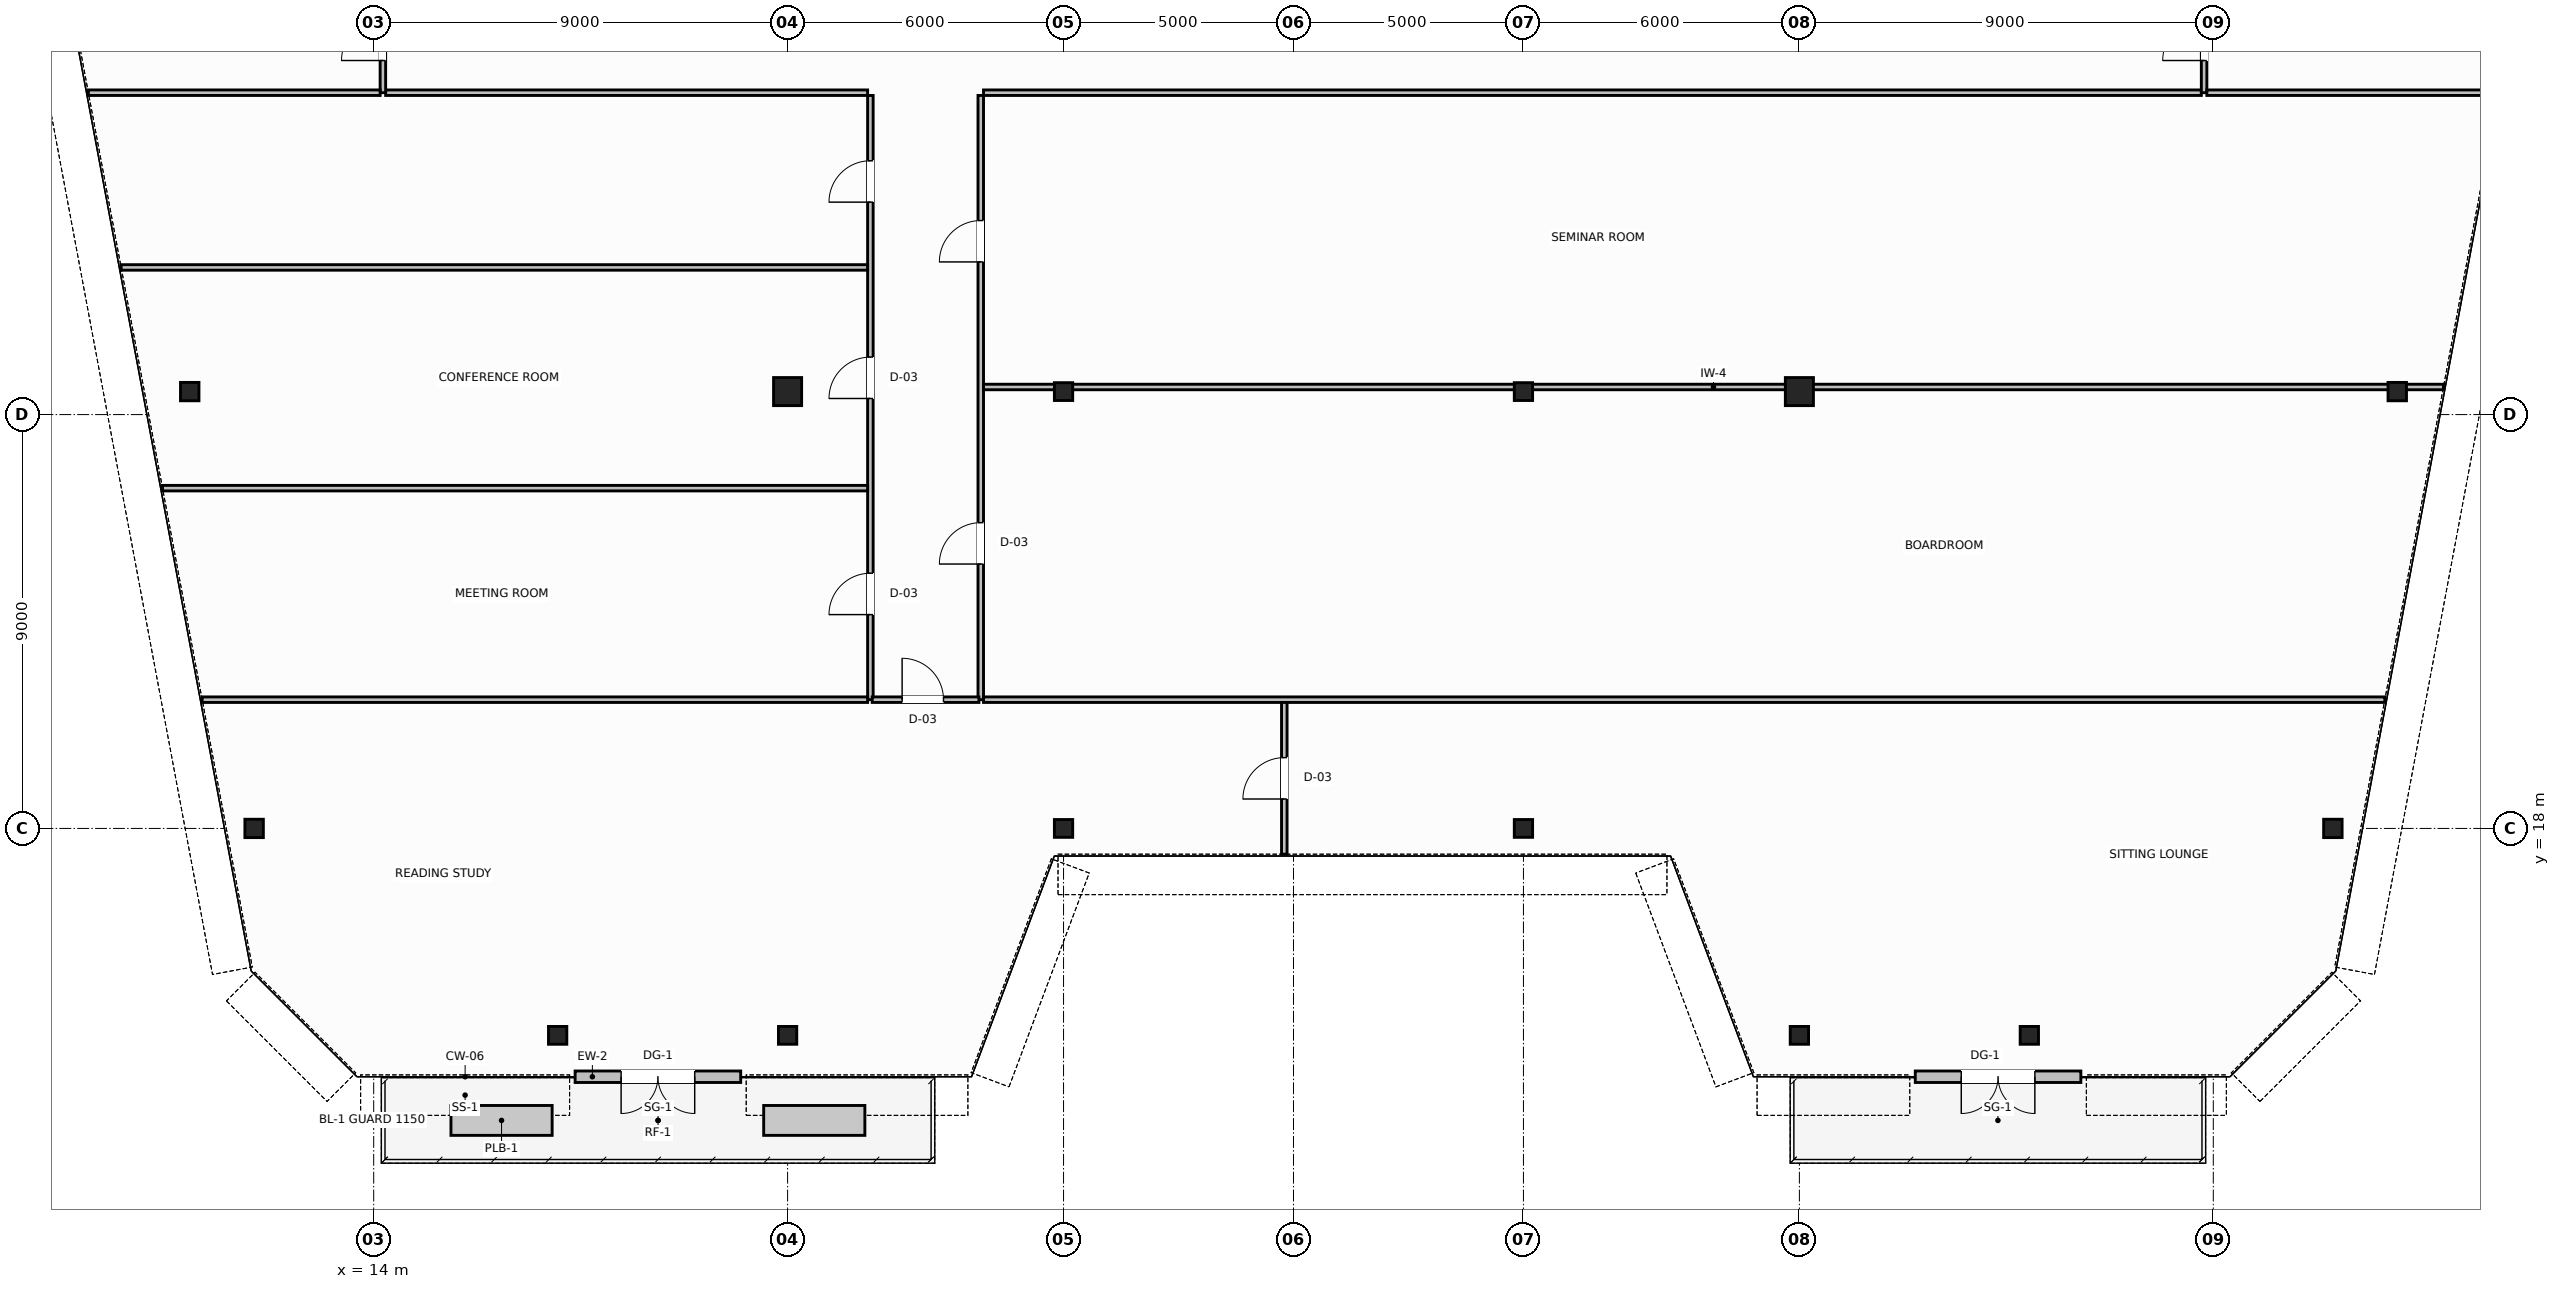
"""IFC4 building model, lengths in metres.
Left out: names, types, materials, properties, quantities, classifications, styles, units other than length and angle.
Written with IfcOpenShell. Run it as: python <this file> out.ifc"""

import sys

from ifc_helpers import new_model, si_unit, direction, frame, frame_2d, origin, origin_2d, place, context, subcontext, project, spatial, rectangle, hollow_circle, i_section, extrude, source, transform, mapped, element, fill, save


model = new_model("IFC4")
c1 = context("Model", 3, precision=1e-05, world=origin(), true_north=direction((0.0, 1.0)))
c2 = subcontext(c1, "Body", "Model", "MODEL_VIEW")
j1 = project(units=[si_unit("LENGTHUNIT", "METRE"), si_unit("PLANEANGLEUNIT", "RADIAN")], contexts=[c1])
p1 = place(None, origin())
s1 = spatial("IfcSite", under=j1, at=p1, CompositionType="ELEMENT")
p2 = place(p1, origin())
s2 = spatial("IfcBuilding", under=s1, at=p2, CompositionType="ELEMENT")
p3 = place(p2, frame((0.0, 0.0, 268.8)))
s3 = spatial("IfcBuildingStorey", under=s2, at=p3, CompositionType="ELEMENT", Elevation=268.8)
m1 = source(origin(), c2, "Body", "SweptSolid", [
    extrude(i_section(OverallWidth=0.401, OverallDepth=0.399, WebThickness=0.025, FlangeThickness=0.035, FilletRadius=0.015, at=origin_2d()), origin(), (0.0, 0.0, 1.0), 3.8),
])
for number, where, z_axis, x_axis in (
    (1, (10.0, 27.5, 0.0), (0.0, 0.0, 1.0), (1.0, 0.0, 0.0)),
    (2, (11.4, 18.0, 0.0), (0.0, 0.0, 1.0), (1.0, 0.0, 0.0)),
    (3, (58.0, 27.5, 0.0), (0.0, 0.0, 1.0), (1.0, 0.0, 0.0)),
    (4, (56.6, 18.0, 0.0), (0.0, 0.0, 1.0), (1.0, 0.0, 0.0)),
):
    element("IfcColumn", number, at=place(p3, frame(where, z_axis=z_axis, x_axis=x_axis)), inside=s3, PredefinedType="COLUMN", context=c2, shape_type="MappedRepresentation", body=[
        mapped(m1, transform((0.0, 0.0, 0.0), scale=1.0)),
    ])
m2 = source(origin(), c2, "Body", "SweptSolid", [
    extrude(hollow_circle(Radius=0.305, WallThickness=0.03, at=origin_2d()), origin(), (0.0, 0.0, 1.0), 3.8),
])
p4 = place(p3, frame((23.0, 27.5, 0.0), z_axis=(0.0, 0.0, 1.0), x_axis=(1.0, 0.0, 0.0)))
e5 = element("IfcColumn", 5, at=p4, inside=s3, PredefinedType="COLUMN", context=c2, shape_type="MappedRepresentation", body=[
    mapped(m2, transform((0.0, 0.0, 0.0), scale=1.0)),
])
m3 = source(origin(), c2, "Body", "SweptSolid", [
    extrude(i_section(OverallWidth=0.398, OverallDepth=0.387, WebThickness=0.021, FlangeThickness=0.029, FilletRadius=0.015, at=origin_2d()), origin(), (0.0, 0.0, 1.0), 3.8),
])
for number, where, z_axis, x_axis in (
    (6, (29.0, 27.5, 0.0), (0.0, 0.0, 1.0), (1.0, 0.0, 0.0)),
    (7, (39.0, 27.5, 0.0), (0.0, 0.0, 1.0), (1.0, 0.0, 0.0)),
):
    element("IfcColumn", number, at=place(p3, frame(where, z_axis=z_axis, x_axis=x_axis)), inside=s3, PredefinedType="COLUMN", context=c2, shape_type="MappedRepresentation", body=[
        mapped(m3, transform((0.0, 0.0, 0.0), scale=1.0)),
    ])
p5 = place(p3, frame((45.0, 27.5, 0.0), z_axis=(0.0, 0.0, 1.0), x_axis=(1.0, 0.0, 0.0)))
e8 = element("IfcColumn", 8, at=p5, inside=s3, PredefinedType="COLUMN", context=c2, shape_type="MappedRepresentation", body=[
    mapped(m2, transform((0.0, 0.0, 0.0), scale=1.0)),
])
m4 = source(origin(), c2, "Body", "SweptSolid", [
    extrude(i_section(OverallWidth=0.398, OverallDepth=0.387, WebThickness=0.021, FlangeThickness=0.029, FilletRadius=0.015, at=origin_2d()), origin(), (0.0, 0.0, 1.0), 4.02),
])
for number, where, z_axis, x_axis in (
    (9, (18.0, 13.5, -0.22), (0.0, 0.0, 1.0), (1.0, 0.0, 0.0)),
    (10, (23.0, 13.5, -0.22), (0.0, 0.0, 1.0), (1.0, 0.0, 0.0)),
    (11, (29.0, 18.0, -0.22), (0.0, 0.0, 1.0), (1.0, 0.0, 0.0)),
    (12, (39.0, 18.0, -0.22), (0.0, 0.0, 1.0), (1.0, 0.0, 0.0)),
    (13, (45.0, 13.5, -0.22), (0.0, 0.0, 1.0), (1.0, 0.0, 0.0)),
    (14, (50.0, 13.5, -0.22), (0.0, 0.0, 1.0), (1.0, 0.0, 0.0)),
):
    element("IfcColumn", number, at=place(p3, frame(where, z_axis=z_axis, x_axis=x_axis)), inside=s3, PredefinedType="COLUMN", context=c2, shape_type="MappedRepresentation", body=[
        mapped(m4, transform((0.0, 0.0, 0.0), scale=1.0)),
    ])
p6 = place(p3, frame((21.98, 12.6, 0.0), z_axis=(0.0, 0.0, 1.0), x_axis=(-1.0, 0.0, 0.0)))
e15 = element("IfcWall", 15, at=p6, inside=s3, PredefinedType="STANDARD", context=c2, shape_type="SweptSolid", body=[
    extrude(rectangle(XDim=3.6, YDim=0.25, at=frame_2d((1.8, 0.0))), origin(), (0.0, 0.0, 1.0), 3.58),
])
p7 = place(p6, frame((1.0, 0.0, 0.0)))
e16 = element("IfcOpeningElement", 16, at=p7, cuts=e15, PredefinedType="OPENING", context=c2, shape_type="SweptSolid", body=[
    extrude(rectangle(XDim=1.6, YDim=2.3, at=frame_2d((0.8, 1.15))), frame((0.0, 0.135, 0.0), z_axis=(0.0, -1.0, 0.0), x_axis=(1.0, 0.0, 0.0)), (0.0, 0.0, 1.0), 0.27),
])
for number, where, z_axis, x_axis in (
    (17, (15.68, 11.65, 0.0), (0.0, 0.0, 1.0), (1.0, 0.0, 0.0)),
    (18, (22.48, 11.65, 0.0), (0.0, 0.0, 1.0), (1.0, 0.0, 0.0)),
):
    element("IfcWall", number, at=place(p3, frame(where, z_axis=z_axis, x_axis=x_axis)), inside=s3, PredefinedType="PARAPET", context=c2, shape_type="SweptSolid", body=[
        extrude(rectangle(XDim=2.2, YDim=0.65, at=frame_2d((1.1, 0.0))), origin(), (0.0, 0.0, 1.0), 0.65),
    ])
p8 = place(p3, frame((51.12, 12.6, 0.0), z_axis=(0.0, 0.0, 1.0), x_axis=(-1.0, 0.0, 0.0)))
e19 = element("IfcWall", 19, at=p8, inside=s3, PredefinedType="STANDARD", context=c2, shape_type="SweptSolid", body=[
    extrude(rectangle(XDim=3.6, YDim=0.25, at=frame_2d((1.8, 0.0))), origin(), (0.0, 0.0, 1.0), 3.58),
])
p9 = place(p8, frame((1.0, 0.0, 0.0)))
e20 = element("IfcOpeningElement", 20, at=p9, cuts=e19, PredefinedType="OPENING", context=c2, shape_type="SweptSolid", body=[
    extrude(rectangle(XDim=1.6, YDim=2.3, at=frame_2d((0.8, 1.15))), frame((0.0, 0.135, 0.0), z_axis=(0.0, -1.0, 0.0), x_axis=(1.0, 0.0, 0.0)), (0.0, 0.0, 1.0), 0.27),
])
p10 = place(p3, frame((14.26, 34.0, 0.0), z_axis=(0.0, 0.0, 1.0), x_axis=(1.0, 0.0, 0.0)))
e21 = element("IfcWall", 21, at=p10, inside=s3, PredefinedType="PARTITIONING", context=c2, shape_type="SweptSolid", body=[
    extrude(rectangle(XDim=10.48, YDim=0.12, at=frame_2d((5.24, 0.0))), origin(), (0.0, 0.0, 1.0), 3.58),
])
p11 = place(p3, frame((27.26, 34.0, 0.0), z_axis=(0.0, 0.0, 1.0), x_axis=(1.0, 0.0, 0.0)))
e22 = element("IfcWall", 22, at=p11, inside=s3, PredefinedType="PARTITIONING", context=c2, shape_type="SweptSolid", body=[
    extrude(rectangle(XDim=26.48, YDim=0.12, at=frame_2d((13.24, 0.0))), origin(), (0.0, 0.0, 1.0), 3.58),
])
p12 = place(p3, frame((14.2, 34.0, 0.0), z_axis=(0.0, 0.0, 1.0), x_axis=(0.0, 1.0, 0.0)))
e23 = element("IfcWall", 23, at=p12, inside=s3, PredefinedType="PARTITIONING", context=c2, shape_type="SweptSolid", body=[
    extrude(rectangle(XDim=2.44, YDim=0.12, at=frame_2d((1.22, 0.0))), origin(), (0.0, 0.0, 1.0), 3.58),
])
p13 = place(p12, frame((0.7, 0.0, 0.0)))
e24 = element("IfcOpeningElement", 24, at=p13, cuts=e23, PredefinedType="OPENING", context=c2, shape_type="SweptSolid", body=[
    extrude(rectangle(XDim=0.9, YDim=2.15, at=frame_2d((0.45, 1.075))), frame((0.0, 0.07, 0.0), z_axis=(0.0, -1.0, 0.0), x_axis=(1.0, 0.0, 0.0)), (0.0, 0.0, 1.0), 0.14),
])
p14 = place(p3, frame((53.8, 34.0, 0.0), z_axis=(0.0, 0.0, 1.0), x_axis=(0.0, 1.0, 0.0)))
e25 = element("IfcWall", 25, at=p14, inside=s3, PredefinedType="PARTITIONING", context=c2, shape_type="SweptSolid", body=[
    extrude(rectangle(XDim=2.44, YDim=0.12, at=frame_2d((1.22, 0.0))), origin(), (0.0, 0.0, 1.0), 3.58),
])
p15 = place(p14, frame((0.7, 0.0, 0.0)))
e26 = element("IfcOpeningElement", 26, at=p15, cuts=e25, PredefinedType="OPENING", context=c2, shape_type="SweptSolid", body=[
    extrude(rectangle(XDim=0.9, YDim=2.15, at=frame_2d((0.45, 1.075))), frame((0.0, 0.07, 0.0), z_axis=(0.0, -1.0, 0.0), x_axis=(1.0, 0.0, 0.0)), (0.0, 0.0, 1.0), 0.14),
])
p16 = place(p3, frame((24.8, 20.8, 0.0), z_axis=(0.0, 0.0, 1.0), x_axis=(0.0, 1.0, 0.0)))
e27 = element("IfcWall", 27, at=p16, inside=s3, PredefinedType="PARTITIONING", context=c2, shape_type="SweptSolid", body=[
    extrude(rectangle(XDim=13.14, YDim=0.12, at=frame_2d((6.57, 0.0))), origin(), (0.0, 0.0, 1.0), 3.58),
])
p17 = place(p16, frame((1.85, 0.0, 0.0)))
e28 = element("IfcOpeningElement", 28, at=p17, cuts=e27, PredefinedType="OPENING", context=c2, shape_type="SweptSolid", body=[
    extrude(rectangle(XDim=0.9, YDim=2.15, at=frame_2d((0.45, 1.075))), frame((0.0, 0.07, 0.0), z_axis=(0.0, -1.0, 0.0), x_axis=(1.0, 0.0, 0.0)), (0.0, 0.0, 1.0), 0.14),
])
p18 = place(p16, frame((6.55, 0.0, 0.0)))
e29 = element("IfcOpeningElement", 29, at=p18, cuts=e27, PredefinedType="OPENING", context=c2, shape_type="SweptSolid", body=[
    extrude(rectangle(XDim=0.9, YDim=2.15, at=frame_2d((0.45, 1.075))), frame((0.0, 0.07, 0.0), z_axis=(0.0, -1.0, 0.0), x_axis=(1.0, 0.0, 0.0)), (0.0, 0.0, 1.0), 0.14),
])
p19 = place(p16, frame((10.82, 0.0, 0.0)))
e30 = element("IfcOpeningElement", 30, at=p19, cuts=e27, PredefinedType="OPENING", context=c2, shape_type="SweptSolid", body=[
    extrude(rectangle(XDim=0.9, YDim=2.15, at=frame_2d((0.45, 1.075))), frame((0.0, 0.07, 0.0), z_axis=(0.0, -1.0, 0.0), x_axis=(1.0, 0.0, 0.0)), (0.0, 0.0, 1.0), 0.14),
])
p20 = place(p3, frame((27.2, 20.8, 0.0), z_axis=(0.0, 0.0, 1.0), x_axis=(0.0, 1.0, 0.0)))
e31 = element("IfcWall", 31, at=p20, inside=s3, PredefinedType="PARTITIONING", context=c2, shape_type="SweptSolid", body=[
    extrude(rectangle(XDim=13.14, YDim=0.12, at=frame_2d((6.57, 0.0))), origin(), (0.0, 0.0, 1.0), 3.58),
])
p21 = place(p20, frame((2.95, 0.0, 0.0)))
e32 = element("IfcOpeningElement", 32, at=p21, cuts=e31, PredefinedType="OPENING", context=c2, shape_type="SweptSolid", body=[
    extrude(rectangle(XDim=0.9, YDim=2.15, at=frame_2d((0.45, 1.075))), frame((0.0, 0.07, 0.0), z_axis=(0.0, -1.0, 0.0), x_axis=(1.0, 0.0, 0.0)), (0.0, 0.0, 1.0), 0.14),
])
p22 = place(p20, frame((9.52, 0.0, 0.0)))
e33 = element("IfcOpeningElement", 33, at=p22, cuts=e31, PredefinedType="OPENING", context=c2, shape_type="SweptSolid", body=[
    extrude(rectangle(XDim=0.9, YDim=2.15, at=frame_2d((0.45, 1.075))), frame((0.0, 0.07, 0.0), z_axis=(0.0, -1.0, 0.0), x_axis=(1.0, 0.0, 0.0)), (0.0, 0.0, 1.0), 0.14),
])
p23 = place(p3, frame((24.84, 20.8, 0.0), z_axis=(0.0, 0.0, 1.0), x_axis=(1.0, 0.0, 0.0)))
e34 = element("IfcWall", 34, at=p23, inside=s3, PredefinedType="PARTITIONING", context=c2, shape_type="SweptSolid", body=[
    extrude(rectangle(XDim=2.32, YDim=0.12, at=frame_2d((1.16, 0.0))), origin(), (0.0, 0.0, 1.0), 3.58),
])
p24 = place(p23, frame((0.65, 0.0, 0.0)))
e35 = element("IfcOpeningElement", 35, at=p24, cuts=e34, PredefinedType="OPENING", context=c2, shape_type="SweptSolid", body=[
    extrude(rectangle(XDim=0.9, YDim=2.15, at=frame_2d((0.45, 1.075))), frame((0.0, 0.07, 0.0), z_axis=(0.0, -1.0, 0.0), x_axis=(1.0, 0.0, 0.0)), (0.0, 0.0, 1.0), 0.14),
])
for number, where, z_axis, x_axis in (
    (36, (7.796, 34.0, 0.0), (0.0, 0.0, 1.0), (1.0, 0.0, 0.0)),
    (37, (53.86, 34.0, 0.0), (0.0, 0.0, 1.0), (1.0, 0.0, 0.0)),
):
    element("IfcWall", number, at=place(p3, frame(where, z_axis=z_axis, x_axis=x_axis)), inside=s3, PredefinedType="PARTITIONING", context=c2, shape_type="SweptSolid", body=[
        extrude(rectangle(XDim=6.344, YDim=0.12, at=frame_2d((3.172, 0.0))), origin(), (0.0, 0.0, 1.0), 3.58),
    ])
p25 = place(p3, frame((9.408, 25.4, 0.0), z_axis=(0.0, 0.0, 1.0), x_axis=(1.0, 0.0, 0.0)))
e38 = element("IfcWall", 38, at=p25, inside=s3, PredefinedType="PARTITIONING", context=c2, shape_type="SweptSolid", body=[
    extrude(rectangle(XDim=15.332, YDim=0.12, at=frame_2d((7.666, 0.0))), origin(), (0.0, 0.0, 1.0), 3.58),
])
p26 = place(p3, frame((8.508, 30.2, 0.0), z_axis=(0.0, 0.0, 1.0), x_axis=(1.0, 0.0, 0.0)))
e39 = element("IfcWall", 39, at=p26, inside=s3, PredefinedType="PARTITIONING", context=c2, shape_type="SweptSolid", body=[
    extrude(rectangle(XDim=16.232, YDim=0.12, at=frame_2d((8.116, 0.0))), origin(), (0.0, 0.0, 1.0), 3.58),
])
p27 = place(p3, frame((27.26, 27.6, 0.0), z_axis=(0.0, 0.0, 1.0), x_axis=(1.0, 0.0, 0.0)))
e40 = element("IfcWall", 40, at=p27, inside=s3, PredefinedType="PARTITIONING", context=c2, shape_type="SweptSolid", body=[
    extrude(rectangle(XDim=31.745, YDim=0.12, at=frame_2d((15.872, 0.0))), origin(), (0.0, 0.0, 1.0), 3.02),
])
p28 = place(p3, frame((10.27, 20.8, 0.0), z_axis=(0.0, 0.0, 1.0), x_axis=(1.0, 0.0, 0.0)))
e41 = element("IfcWall", 41, at=p28, inside=s3, PredefinedType="PARTITIONING", context=c2, shape_type="SweptSolid", body=[
    extrude(rectangle(XDim=14.47, YDim=0.12, at=frame_2d((7.235, 0.0))), origin(), (0.0, 0.0, 1.0), 3.58),
])
p29 = place(p3, frame((27.26, 20.8, 0.0), z_axis=(0.0, 0.0, 1.0), x_axis=(1.0, 0.0, 0.0)))
e42 = element("IfcWall", 42, at=p29, inside=s3, PredefinedType="PARTITIONING", context=c2, shape_type="SweptSolid", body=[
    extrude(rectangle(XDim=30.47, YDim=0.12, at=frame_2d((15.235, 0.0))), origin(), (0.0, 0.0, 1.0), 3.58),
])
p30 = place(p3, frame((33.8, 17.44, 0.0), z_axis=(0.0, 0.0, 1.0), x_axis=(0.0, 1.0, 0.0)))
e43 = element("IfcWall", 43, at=p30, inside=s3, PredefinedType="PARTITIONING", context=c2, shape_type="SweptSolid", body=[
    extrude(rectangle(XDim=3.3, YDim=0.12, at=frame_2d((1.65, 0.0))), origin(), (0.0, 0.0, 1.0), 3.58),
])
p31 = place(p30, frame((1.2, 0.0, 0.0)))
e44 = element("IfcOpeningElement", 44, at=p31, cuts=e43, PredefinedType="OPENING", context=c2, shape_type="SweptSolid", body=[
    extrude(rectangle(XDim=0.9, YDim=2.15, at=frame_2d((0.45, 1.075))), frame((0.0, 0.07, 0.0), z_axis=(0.0, -1.0, 0.0), x_axis=(1.0, 0.0, 0.0)), (0.0, 0.0, 1.0), 0.14),
])
m5 = source(origin(), c2, "Body", "SweptSolid", [
    extrude(rectangle(XDim=1.6, YDim=2.3, at=frame_2d((0.8, 1.15))), frame((0.0, 0.025, 0.0), z_axis=(0.0, -1.0, 0.0), x_axis=(1.0, 0.0, 0.0)), (0.0, 0.0, 1.0), 0.05),
])
p32 = place(p7, origin())
e45 = element("IfcDoor", 45, at=p32, inside=s3, OperationType="DOUBLE_DOOR_SINGLE_SWING", PredefinedType="DOOR", context=c2, shape_type="MappedRepresentation", body=[
    mapped(m5, transform((0.0, 0.0, 0.0), scale=1.0)),
])
fill(e16, e45)
p33 = place(p9, origin())
e46 = element("IfcDoor", 46, at=p33, inside=s3, OperationType="DOUBLE_DOOR_SINGLE_SWING", PredefinedType="DOOR", context=c2, shape_type="MappedRepresentation", body=[
    mapped(m5, transform((0.0, 0.0, 0.0), scale=1.0)),
])
fill(e20, e46)
m6 = source(origin(), c2, "Body", "SweptSolid", [
    extrude(rectangle(XDim=0.9, YDim=2.15, at=frame_2d((0.45, 1.075))), frame((0.0, 0.025, 0.0), z_axis=(0.0, -1.0, 0.0), x_axis=(1.0, 0.0, 0.0)), (0.0, 0.0, 1.0), 0.05),
])
p34 = place(p13, origin())
e47 = element("IfcDoor", 47, at=p34, inside=s3, OperationType="SINGLE_SWING_LEFT", PredefinedType="DOOR", context=c2, shape_type="MappedRepresentation", body=[
    mapped(m6, transform((0.0, 0.0, 0.0), scale=1.0)),
])
fill(e24, e47)
p35 = place(p15, origin())
e48 = element("IfcDoor", 48, at=p35, inside=s3, OperationType="SINGLE_SWING_RIGHT", PredefinedType="DOOR", context=c2, shape_type="MappedRepresentation", body=[
    mapped(m6, transform((0.0, 0.0, 0.0), scale=1.0)),
])
fill(e26, e48)
p36 = place(p17, origin())
e49 = element("IfcDoor", 49, at=p36, inside=s3, OperationType="SINGLE_SWING_LEFT", PredefinedType="DOOR", context=c2, shape_type="MappedRepresentation", body=[
    mapped(m6, transform((0.0, 0.0, 0.0), scale=1.0)),
])
fill(e28, e49)
p37 = place(p18, origin())
e50 = element("IfcDoor", 50, at=p37, inside=s3, OperationType="SINGLE_SWING_RIGHT", PredefinedType="DOOR", context=c2, shape_type="MappedRepresentation", body=[
    mapped(m6, transform((0.0, 0.0, 0.0), scale=1.0)),
])
fill(e29, e50)
p38 = place(p19, origin())
e51 = element("IfcDoor", 51, at=p38, inside=s3, OperationType="SINGLE_SWING_LEFT", PredefinedType="DOOR", context=c2, shape_type="MappedRepresentation", body=[
    mapped(m6, transform((0.0, 0.0, 0.0), scale=1.0)),
])
fill(e30, e51)
p39 = place(p21, origin())
e52 = element("IfcDoor", 52, at=p39, inside=s3, OperationType="SINGLE_SWING_RIGHT", PredefinedType="DOOR", context=c2, shape_type="MappedRepresentation", body=[
    mapped(m6, transform((0.0, 0.0, 0.0), scale=1.0)),
])
fill(e32, e52)
p40 = place(p22, origin())
e53 = element("IfcDoor", 53, at=p40, inside=s3, OperationType="SINGLE_SWING_LEFT", PredefinedType="DOOR", context=c2, shape_type="MappedRepresentation", body=[
    mapped(m6, transform((0.0, 0.0, 0.0), scale=1.0)),
])
fill(e33, e53)
p41 = place(p24, origin())
e54 = element("IfcDoor", 54, at=p41, inside=s3, OperationType="SINGLE_SWING_LEFT", PredefinedType="DOOR", context=c2, shape_type="MappedRepresentation", body=[
    mapped(m6, transform((0.0, 0.0, 0.0), scale=1.0)),
])
fill(e35, e54)
p42 = place(p31, origin())
e55 = element("IfcDoor", 55, at=p42, inside=s3, OperationType="SINGLE_SWING_RIGHT", PredefinedType="DOOR", context=c2, shape_type="MappedRepresentation", body=[
    mapped(m6, transform((0.0, 0.0, 0.0), scale=1.0)),
])
fill(e44, e55)
save(model, sys.argv[1])
